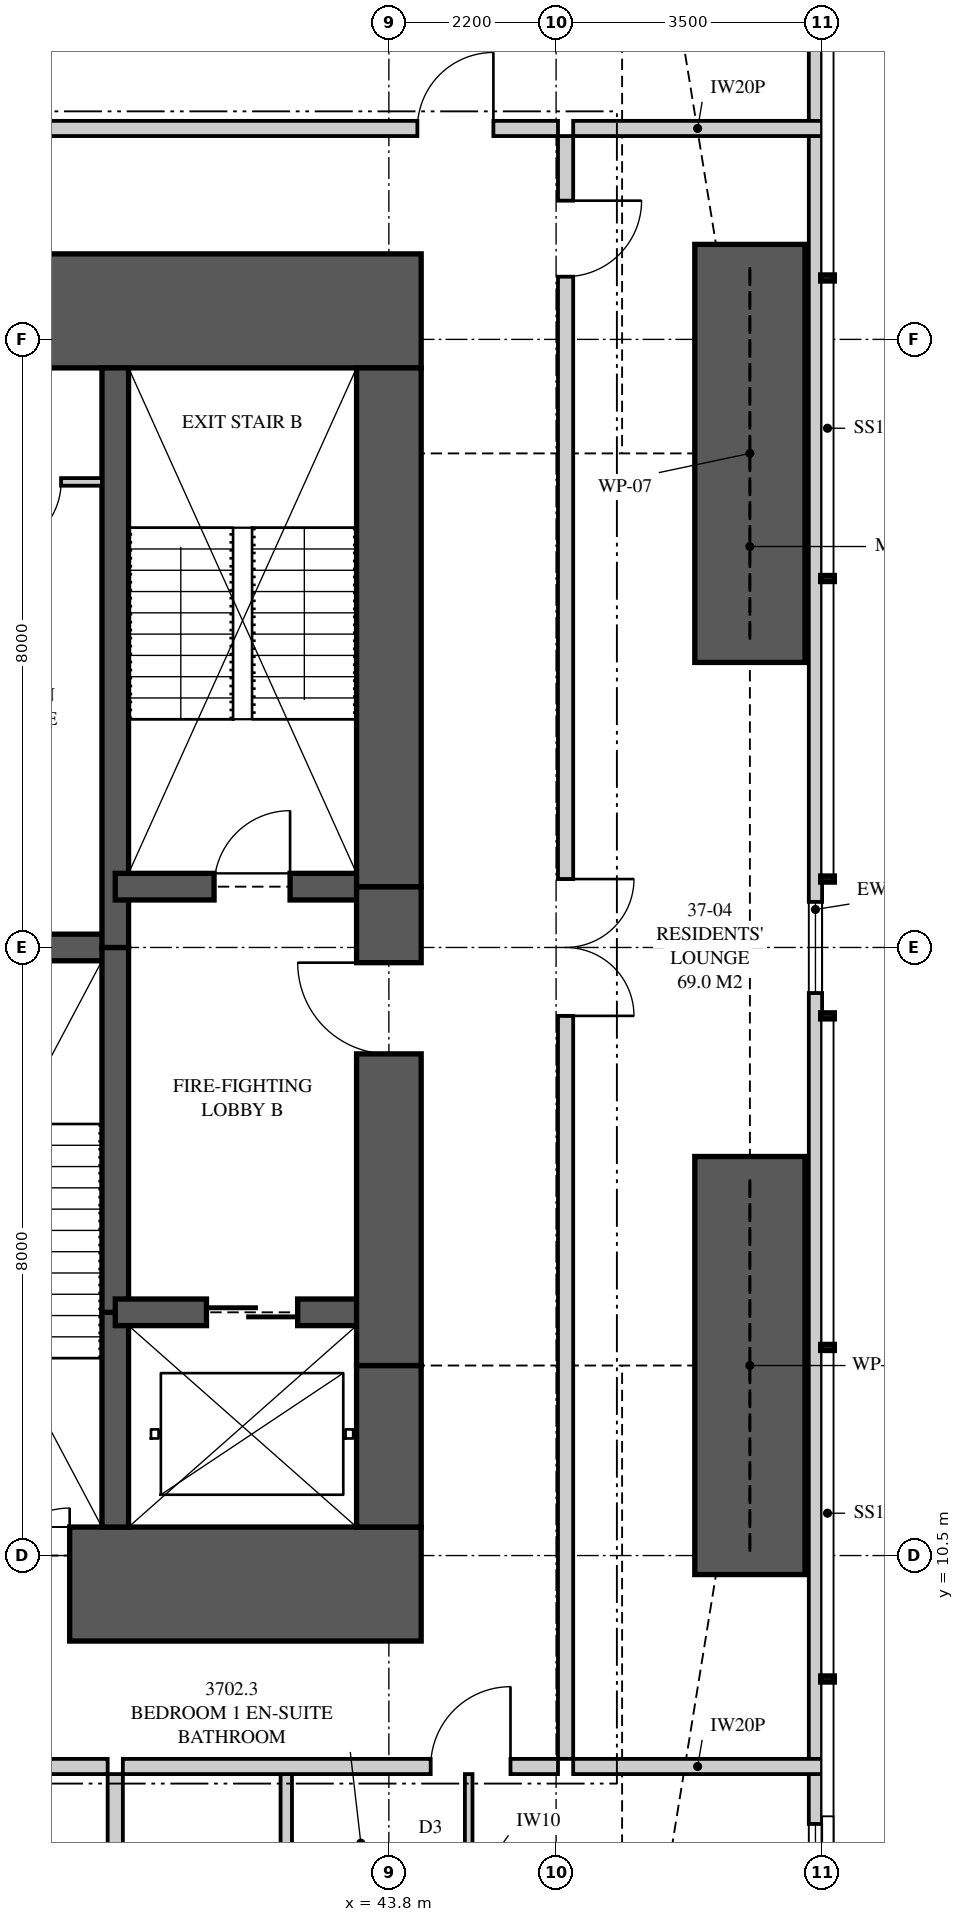
"""IFC4 building model, lengths in metres.
Left out: names, types, materials, properties, quantities, classifications, styles, units other than length and angle.
Written with IfcOpenShell. Run it as: python <this file> out.ifc"""

import sys

from ifc_helpers import new_model, si_unit, direction, frame, frame_2d, origin, place, context, subcontext, project, spatial, polyline, rectangle, outline, extrude, element, fill, save


model = new_model("IFC4")
c1 = context("Model", 3, precision=1e-05, world=origin(), true_north=direction((0.0, 1.0)))
c2 = subcontext(c1, "Body", "Model", "MODEL_VIEW")
j1 = project(units=[si_unit("LENGTHUNIT", "METRE"), si_unit("PLANEANGLEUNIT", "RADIAN")], contexts=[c1])
p1 = place(None, origin())
s1 = spatial("IfcSite", under=j1, at=p1, CompositionType="ELEMENT")
p2 = place(p1, origin())
s2 = spatial("IfcBuilding", under=s1, at=p2, CompositionType="ELEMENT")
p3 = place(p2, frame((0.0, 0.0, 135.0)))
s3 = spatial("IfcBuildingStorey", under=s2, at=p3, CompositionType="ELEMENT", Elevation=135.0)
p4 = place(p3, frame((35.9, 10.125, 0.0), z_axis=(0.0, 0.0, 1.0), x_axis=(1.0, 0.0, 0.0)))
e1 = element("IfcWall", 1, at=p4, inside=s3, PredefinedType="SHEAR", context=c2, shape_type="SweptSolid", body=[
    extrude(rectangle(XDim=8.325, YDim=1.5, at=frame_2d((4.163, 0.0))), origin(), (0.0, 0.0, 1.0), 3.35),
])
p5 = place(p4, frame((2.7, 0.0, 0.0)))
e2 = element("IfcOpeningElement", 2, at=p5, cuts=e1, PredefinedType="OPENING", context=c2, shape_type="SweptSolid", body=[
    extrude(rectangle(XDim=1.0, YDim=2.1, at=frame_2d((0.5, 1.05))), frame((0.0, 0.76, 0.0), z_axis=(0.0, -1.0, 0.0), x_axis=(1.0, 0.0, 0.0)), (0.0, 0.0, 1.0), 1.52),
])
p6 = place(p3, frame((44.225, 26.875, 0.0), z_axis=(0.0, 0.0, 1.0), x_axis=(-1.0, 0.0, 0.0)))
e3 = element("IfcWall", 3, at=p6, inside=s3, PredefinedType="SHEAR", context=c2, shape_type="SweptSolid", body=[
    extrude(rectangle(XDim=8.325, YDim=1.5, at=frame_2d((4.163, 0.0))), origin(), (0.0, 0.0, 1.0), 3.35),
])
p7 = place(p6, frame((5.725, 0.0, 0.0)))
e4 = element("IfcOpeningElement", 4, at=p7, cuts=e3, PredefinedType="OPENING", context=c2, shape_type="SweptSolid", body=[
    extrude(rectangle(XDim=0.9, YDim=2.1, at=frame_2d((0.45, 1.05))), frame((0.0, 0.76, 0.0), z_axis=(0.0, -1.0, 0.0), x_axis=(1.0, 0.0, 0.0)), (0.0, 0.0, 1.0), 1.52),
])
p8 = place(p3, frame((43.8, 10.875, 0.0), z_axis=(0.0, 0.0, 1.0), x_axis=(0.0, 1.0, 0.0)))
e5 = element("IfcWall", 5, at=p8, inside=s3, PredefinedType="SHEAR", context=c2, shape_type="SweptSolid", body=[
    extrude(rectangle(XDim=2.125, YDim=0.85, at=frame_2d((1.062, 0.0))), origin(), (0.0, 0.0, 1.0), 3.35),
])
p9 = place(p3, frame((43.8, 13.0, 0.0), z_axis=(0.0, 0.0, 1.0), x_axis=(0.0, 1.0, 0.0)))
e6 = element("IfcWall", 6, at=p9, inside=s3, PredefinedType="SHEAR", context=c2, shape_type="SweptSolid", body=[
    extrude(rectangle(XDim=6.3, YDim=0.85, at=frame_2d((3.15, 0.0))), origin(), (0.0, 0.0, 1.0), 3.35),
])
p10 = place(p9, frame((4.1, 0.0, 0.0)))
e7 = element("IfcOpeningElement", 7, at=p10, cuts=e6, PredefinedType="OPENING", context=c2, shape_type="SweptSolid", body=[
    extrude(rectangle(XDim=1.2, YDim=2.2, at=frame_2d((0.6, 1.1))), frame((0.0, 0.435, 0.0), z_axis=(0.0, -1.0, 0.0), x_axis=(1.0, 0.0, 0.0)), (0.0, 0.0, 1.0), 0.87),
])
p11 = place(p3, frame((43.8, 19.3, 0.0), z_axis=(0.0, 0.0, 1.0), x_axis=(0.0, 1.0, 0.0)))
e8 = element("IfcWall", 8, at=p11, inside=s3, PredefinedType="SHEAR", context=c2, shape_type="SweptSolid", body=[
    extrude(rectangle(XDim=6.825, YDim=0.85, at=frame_2d((3.413, 0.0))), origin(), (0.0, 0.0, 1.0), 3.35),
])
p12 = place(p3, frame((40.2, 10.875, 0.0), z_axis=(0.0, 0.0, 1.0), x_axis=(0.0, 1.0, 0.0)))
e9 = element("IfcWall", 9, at=p12, inside=s3, PredefinedType="SHEAR", context=c2, shape_type="SweptSolid", body=[
    extrude(rectangle(XDim=2.825, YDim=0.35, at=frame_2d((1.413, 0.0))), origin(), (0.0, 0.0, 1.0), 3.35),
])
p13 = place(p3, frame((40.2, 13.7, 0.0), z_axis=(0.0, 0.0, 1.0), x_axis=(0.0, 1.0, 0.0)))
e10 = element("IfcWall", 10, at=p13, inside=s3, PredefinedType="SHEAR", context=c2, shape_type="SweptSolid", body=[
    extrude(rectangle(XDim=4.8, YDim=0.35, at=frame_2d((2.4, 0.0))), origin(), (0.0, 0.0, 1.0), 3.35),
])
p14 = place(p3, frame((40.2, 18.5, 0.0), z_axis=(0.0, 0.0, 1.0), x_axis=(0.0, 1.0, 0.0)))
e11 = element("IfcWall", 11, at=p14, inside=s3, PredefinedType="SHEAR", context=c2, shape_type="SweptSolid", body=[
    extrude(rectangle(XDim=7.625, YDim=0.35, at=frame_2d((3.812, 0.0))), origin(), (0.0, 0.0, 1.0), 3.35),
])
p15 = place(p3, frame((35.9, 18.5, 0.0), z_axis=(0.0, 0.0, 1.0), x_axis=(1.0, 0.0, 0.0)))
e12 = element("IfcWall", 12, at=p15, inside=s3, PredefinedType="SHEAR", context=c2, shape_type="SweptSolid", body=[
    extrude(rectangle(XDim=4.3, YDim=0.35, at=frame_2d((2.15, 0.0))), origin(), (0.0, 0.0, 1.0), 3.35),
])
p16 = place(p3, frame((40.2, 13.7, 0.0), z_axis=(0.0, 0.0, 1.0), x_axis=(1.0, 0.0, 0.0)))
e13 = element("IfcWall", 13, at=p16, inside=s3, PredefinedType="SHEAR", context=c2, shape_type="SweptSolid", body=[
    extrude(rectangle(XDim=3.6, YDim=0.35, at=frame_2d((1.8, 0.0))), origin(), (0.0, 0.0, 1.0), 3.35),
])
p17 = place(p16, frame((1.2, 0.0, 0.0)))
e14 = element("IfcOpeningElement", 14, at=p17, cuts=e13, PredefinedType="OPENING", context=c2, shape_type="SweptSolid", body=[
    extrude(rectangle(XDim=1.2, YDim=2.1, at=frame_2d((0.6, 1.05))), frame((0.0, 0.185, 0.0), z_axis=(0.0, -1.0, 0.0), x_axis=(1.0, 0.0, 0.0)), (0.0, 0.0, 1.0), 0.37),
])
p18 = place(p3, frame((40.2, 19.3, 0.0), z_axis=(0.0, 0.0, 1.0), x_axis=(1.0, 0.0, 0.0)))
e15 = element("IfcWall", 15, at=p18, inside=s3, PredefinedType="SHEAR", context=c2, shape_type="SweptSolid", body=[
    extrude(rectangle(XDim=3.6, YDim=0.35, at=frame_2d((1.8, 0.0))), origin(), (0.0, 0.0, 1.0), 3.35),
])
p19 = place(p18, frame((1.3, 0.0, 0.0)))
e16 = element("IfcOpeningElement", 16, at=p19, cuts=e15, PredefinedType="OPENING", context=c2, shape_type="SweptSolid", body=[
    extrude(rectangle(XDim=1.0, YDim=2.1, at=frame_2d((0.5, 1.05))), frame((0.0, 0.185, 0.0), z_axis=(0.0, -1.0, 0.0), x_axis=(1.0, 0.0, 0.0)), (0.0, 0.0, 1.0), 0.37),
])
p20 = place(p3, frame((49.413, 3.051, 0.0), z_axis=(0.0, 0.0, 1.0), x_axis=(0.0, 1.0, 0.0)))
e17 = element("IfcWall", 17, at=p20, inside=s3, PredefinedType="SOLIDWALL", context=c2, shape_type="SweptSolid", body=[
    extrude(outline(polyline([(0.0, 0.0), (31.897, 0.0), (31.897, 3.11), (22.167, 3.11), (22.167, 2.15), (22.074, 2.15), (22.074, 3.11), (21.949, 3.11), (21.949, 2.15), (9.949, 2.15), (9.949, 3.11), (9.823, 3.11), (9.823, 2.15), (9.73, 2.15), (9.73, 3.11), (0.0, 3.11), (0.0, 0.0)])), frame((0.0, 0.087, 0.0), z_axis=(0.0, -1.0, 0.0), x_axis=(1.0, 0.0, 0.0)), (0.0, 0.0, 1.0), 0.175),
])
p21 = place(p20, frame((2.118, 0.0, 0.4)))
e18 = element("IfcOpeningElement", 18, at=p21, cuts=e17, PredefinedType="OPENING", context=c2, shape_type="SweptSolid", body=[
    extrude(rectangle(XDim=1.8, YDim=1.7, at=frame_2d((0.9, 0.85))), frame((0.0, 0.097, 0.0), z_axis=(0.0, -1.0, 0.0), x_axis=(1.0, 0.0, 0.0)), (0.0, 0.0, 1.0), 0.195),
])
p22 = place(p20, frame((14.849, 0.0, 0.4)))
e19 = element("IfcOpeningElement", 19, at=p22, cuts=e17, PredefinedType="OPENING", context=c2, shape_type="SweptSolid", body=[
    extrude(rectangle(XDim=1.2, YDim=1.7, at=frame_2d((0.6, 0.85))), frame((0.0, 0.097, 0.0), z_axis=(0.0, -1.0, 0.0), x_axis=(1.0, 0.0, 0.0)), (0.0, 0.0, 1.0), 0.195),
])
p23 = place(p20, frame((28.51, 0.0, 0.4)))
e20 = element("IfcOpeningElement", 20, at=p23, cuts=e17, PredefinedType="OPENING", context=c2, shape_type="SweptSolid", body=[
    extrude(rectangle(XDim=1.2, YDim=1.7, at=frame_2d((0.6, 0.85))), frame((0.0, 0.097, 0.0), z_axis=(0.0, -1.0, 0.0), x_axis=(1.0, 0.0, 0.0)), (0.0, 0.0, 1.0), 0.195),
])
p24 = place(p3, frame((40.2, 0.175, 0.0), z_axis=(0.0, 0.0, 1.0), x_axis=(0.0, 1.0, 0.0)))
e21 = element("IfcWall", 21, at=p24, inside=s3, PredefinedType="PARTITIONING", context=c2, shape_type="SweptSolid", body=[
    extrude(outline(polyline([(0.167, 3.11), (0.0, 3.11), (0.0, 0.0), (0.529, 0.0), (0.529, 0.427), (1.021, 0.427), (1.021, 0.0), (7.45, 0.0), (7.45, 3.11), (3.766, 3.11), (3.766, 2.51), (2.025, 2.51), (2.025, 2.15), (1.021, 2.15), (1.021, 1.723), (0.529, 1.723), (0.529, 2.15), (0.167, 2.15), (0.167, 3.11)])), frame((0.0, 0.1, 0.0), z_axis=(0.0, -1.0, 0.0), x_axis=(1.0, 0.0, 0.0)), (0.0, 0.0, 1.0), 0.2),
])
p25 = place(p3, frame((17.775, 7.725, 0.0), z_axis=(0.0, 0.0, 1.0), x_axis=(1.0, 0.0, 0.0)))
e22 = element("IfcWall", 22, at=p25, inside=s3, PredefinedType="PARTITIONING", context=c2, shape_type="SweptSolid", body=[
    extrude(outline(polyline([(0.0, 0.0), (22.325, 0.0), (22.325, 3.11), (21.187, 3.11), (21.187, 2.541), (20.513, 2.541), (20.513, 3.11), (10.312, 3.11), (10.312, 2.541), (9.638, 2.541), (9.638, 3.11), (0.0, 3.11), (0.0, 0.0)])), frame((0.0, 0.1, 0.0), z_axis=(0.0, -1.0, 0.0), x_axis=(1.0, 0.0, 0.0)), (0.0, 0.0, 1.0), 0.2),
])
p26 = place(p25, frame((4.825, 0.0, 0.0)))
e23 = element("IfcOpeningElement", 23, at=p26, cuts=e22, PredefinedType="OPENING", context=c2, shape_type="SweptSolid", body=[
    extrude(rectangle(XDim=1.05, YDim=2.2, at=frame_2d((0.525, 1.1))), frame((0.0, 0.11, 0.0), z_axis=(0.0, -1.0, 0.0), x_axis=(1.0, 0.0, 0.0)), (0.0, 0.0, 1.0), 0.22),
])
p27 = place(p3, frame((40.3, 7.725, 0.0), z_axis=(0.0, 0.0, 1.0), x_axis=(1.0, 0.0, 0.0)))
e24 = element("IfcWall", 24, at=p27, inside=s3, PredefinedType="PARTITIONING", context=c2, shape_type="SweptSolid", body=[
    extrude(rectangle(XDim=5.725, YDim=0.2, at=frame_2d((2.862, 0.0))), origin(), (0.0, 0.0, 1.0), 3.11),
])
p28 = place(p27, frame((4.05, 0.0, 0.0)))
e25 = element("IfcOpeningElement", 25, at=p28, cuts=e24, PredefinedType="OPENING", context=c2, shape_type="SweptSolid", body=[
    extrude(rectangle(XDim=1.05, YDim=2.2, at=frame_2d((0.525, 1.1))), frame((0.0, 0.11, 0.0), z_axis=(0.0, -1.0, 0.0), x_axis=(1.0, 0.0, 0.0)), (0.0, 0.0, 1.0), 0.22),
])
p29 = place(p3, frame((44.85, 4.539, 0.0), z_axis=(0.0, 0.0, 1.0), x_axis=(0.0, 1.0, 0.0)))
e26 = element("IfcWall", 26, at=p29, inside=s3, PredefinedType="PARTITIONING", context=c2, shape_type="SweptSolid", body=[
    extrude(rectangle(XDim=3.086, YDim=0.1, at=frame_2d((1.543, 0.0))), origin(), (0.0, 0.0, 1.0), 3.11),
])
p30 = place(p29, frame((1.056, 0.0, 0.0)))
e27 = element("IfcOpeningElement", 27, at=p30, cuts=e26, PredefinedType="OPENING", context=c2, shape_type="SweptSolid", body=[
    extrude(rectangle(XDim=0.9, YDim=2.1, at=frame_2d((0.45, 1.05))), frame((0.0, 0.06, 0.0), z_axis=(0.0, -1.0, 0.0), x_axis=(1.0, 0.0, 0.0)), (0.0, 0.0, 1.0), 0.12),
])
p31 = place(p3, frame((42.45, 4.539, 0.0), z_axis=(0.0, 0.0, 1.0), x_axis=(0.0, 1.0, 0.0)))
e28 = element("IfcWall", 28, at=p31, inside=s3, PredefinedType="PLUMBINGWALL", context=c2, shape_type="SweptSolid", body=[
    extrude(rectangle(XDim=3.086, YDim=0.15, at=frame_2d((1.543, 0.0))), origin(), (0.0, 0.0, 1.0), 3.11),
])
p32 = place(p3, frame((46.225, 7.725, 0.0), z_axis=(0.0, 0.0, 1.0), x_axis=(1.0, 0.0, 0.0)))
e29 = element("IfcWall", 29, at=p32, inside=s3, PredefinedType="PARTITIONING", context=c2, shape_type="SweptSolid", body=[
    extrude(outline(polyline([(0.0, 0.0), (3.275, 0.0), (3.275, 3.11), (2.392, 3.11), (2.392, 2.15), (0.643, 2.15), (0.643, 2.541), (0.306, 2.541), (0.306, 3.11), (0.0, 3.11), (0.0, 0.0)])), frame((0.0, 0.1, 0.0), z_axis=(0.0, -1.0, 0.0), x_axis=(1.0, 0.0, 0.0)), (0.0, 0.0, 1.0), 0.2),
])
p33 = place(p3, frame((46.225, 29.275, 0.0), z_axis=(0.0, 0.0, 1.0), x_axis=(1.0, 0.0, 0.0)))
e30 = element("IfcWall", 30, at=p33, inside=s3, PredefinedType="PARTITIONING", context=c2, shape_type="SweptSolid", body=[
    extrude(outline(polyline([(0.0, 0.0), (3.275, 0.0), (3.275, 3.11), (2.554, 3.11), (2.554, 2.15), (0.805, 2.15), (0.805, 2.541), (0.306, 2.541), (0.306, 3.11), (0.0, 3.11), (0.0, 0.0)])), frame((0.0, 0.1, 0.0), z_axis=(0.0, -1.0, 0.0), x_axis=(1.0, 0.0, 0.0)), (0.0, 0.0, 1.0), 0.2),
])
p34 = place(p3, frame((46.125, 7.825, 0.0), z_axis=(0.0, 0.0, 1.0), x_axis=(0.0, 1.0, 0.0)))
e31 = element("IfcWall", 31, at=p34, inside=s3, PredefinedType="PARTITIONING", context=c2, shape_type="SweptSolid", body=[
    extrude(outline(polyline([(0.0, 0.0), (21.35, 0.0), (21.35, 3.11), (17.512, 3.11), (17.512, 2.541), (16.838, 2.541), (16.838, 3.11), (5.512, 3.11), (5.512, 2.541), (4.838, 2.541), (4.838, 3.11), (0.0, 3.11), (0.0, 0.0)])), frame((0.0, 0.1, 0.0), z_axis=(0.0, -1.0, 0.0), x_axis=(1.0, 0.0, 0.0)), (0.0, 0.0, 1.0), 0.2),
])
p35 = place(p34, frame((9.775, 0.0, 0.0)))
e32 = element("IfcOpeningElement", 32, at=p35, cuts=e31, PredefinedType="OPENING", context=c2, shape_type="SweptSolid", body=[
    extrude(rectangle(XDim=1.8, YDim=2.1, at=frame_2d((0.9, 1.05))), frame((0.0, 0.11, 0.0), z_axis=(0.0, -1.0, 0.0), x_axis=(1.0, 0.0, 0.0)), (0.0, 0.0, 1.0), 0.22),
])
p36 = place(p34, frame((19.5, 0.0, 0.0)))
e33 = element("IfcOpeningElement", 33, at=p36, cuts=e31, PredefinedType="OPENING", context=c2, shape_type="SweptSolid", body=[
    extrude(rectangle(XDim=1.0, YDim=2.1, at=frame_2d((0.5, 1.05))), frame((0.0, 0.11, 0.0), z_axis=(0.0, -1.0, 0.0), x_axis=(1.0, 0.0, 0.0)), (0.0, 0.0, 1.0), 0.22),
])
p37 = place(p3, frame((38.312, 29.275, 0.0), z_axis=(0.0, 0.0, 1.0), x_axis=(1.0, 0.0, 0.0)))
e34 = element("IfcWall", 34, at=p37, inside=s3, PredefinedType="PARTITIONING", context=c2, shape_type="SweptSolid", body=[
    extrude(outline(polyline([(0.0, 0.0), (7.712, 0.0), (7.712, 3.11), (0.65, 3.11), (0.65, 2.541), (0.0, 2.541), (0.0, 3.11), (0.0, 0.0)])), frame((0.0, 0.1, 0.0), z_axis=(0.0, -1.0, 0.0), x_axis=(1.0, 0.0, 0.0)), (0.0, 0.0, 1.0), 0.2),
])
p38 = place(p37, frame((5.863, 0.0, 0.0)))
e35 = element("IfcOpeningElement", 35, at=p38, cuts=e34, PredefinedType="OPENING", context=c2, shape_type="SweptSolid", body=[
    extrude(rectangle(XDim=1.0, YDim=2.1, at=frame_2d((0.5, 1.05))), frame((0.0, 0.11, 0.0), z_axis=(0.0, -1.0, 0.0), x_axis=(1.0, 0.0, 0.0)), (0.0, 0.0, 1.0), 0.22),
])
p39 = place(p3, frame((36.075, 24.625, 0.0), z_axis=(0.0, 0.0, 1.0), x_axis=(1.0, 0.0, 0.0)))
e36 = element("IfcWall", 36, at=p39, inside=s3, PredefinedType="PARTITIONING", context=c2, shape_type="SweptSolid", body=[
    extrude(rectangle(XDim=3.95, YDim=0.1, at=frame_2d((1.975, 0.0))), origin(), (0.0, 0.0, 1.0), 3.11),
])
p40 = place(p39, frame((0.538, 0.0, 0.0)))
e37 = element("IfcOpeningElement", 37, at=p40, cuts=e36, PredefinedType="OPENING", context=c2, shape_type="SweptSolid", body=[
    extrude(rectangle(XDim=0.9, YDim=2.1, at=frame_2d((0.45, 1.05))), frame((0.0, 0.06, 0.0), z_axis=(0.0, -1.0, 0.0), x_axis=(1.0, 0.0, 0.0)), (0.0, 0.0, 1.0), 0.12),
])
p41 = place(p39, frame((2.512, 0.0, 0.0)))
e38 = element("IfcOpeningElement", 38, at=p41, cuts=e36, PredefinedType="OPENING", context=c2, shape_type="SweptSolid", body=[
    extrude(rectangle(XDim=0.9, YDim=2.1, at=frame_2d((0.45, 1.05))), frame((0.0, 0.06, 0.0), z_axis=(0.0, -1.0, 0.0), x_axis=(1.0, 0.0, 0.0)), (0.0, 0.0, 1.0), 0.12),
])
for number, where, z_axis, x_axis in (
    (39, (48.55, 10.25, 0.0), (0.0, 0.0, 1.0), (0.0, 1.0, 0.0)),
    (40, (48.55, 22.25, 0.0), (0.0, 0.0, 1.0), (0.0, 1.0, 0.0)),
):
    element("IfcWall", number, at=place(p3, frame(where, z_axis=z_axis, x_axis=x_axis)), inside=s3, PredefinedType="SHEAR", context=c2, shape_type="SweptSolid", body=[
        extrude(rectangle(XDim=5.5, YDim=1.45, at=frame_2d((2.75, 0.0))), origin(), (0.0, 0.0, 1.0), 3.35),
    ])
p42 = place(p21, origin())
e41 = element("IfcWindow", 41, at=p42, inside=s3, PartitioningType="SINGLE_PANEL", PredefinedType="WINDOW", context=c2, shape_type="SweptSolid", body=[
    extrude(rectangle(XDim=1.8, YDim=1.7, at=frame_2d((0.9, 0.85))), frame((0.0, 0.03, 0.0), z_axis=(0.0, -1.0, 0.0), x_axis=(1.0, 0.0, 0.0)), (0.0, 0.0, 1.0), 0.06),
])
fill(e18, e41)
p43 = place(p22, origin())
e42 = element("IfcWindow", 42, at=p43, inside=s3, PartitioningType="SINGLE_PANEL", PredefinedType="WINDOW", context=c2, shape_type="SweptSolid", body=[
    extrude(rectangle(XDim=1.2, YDim=1.7, at=frame_2d((0.6, 0.85))), frame((0.0, 0.03, 0.0), z_axis=(0.0, -1.0, 0.0), x_axis=(1.0, 0.0, 0.0)), (0.0, 0.0, 1.0), 0.06),
])
fill(e19, e42)
p44 = place(p28, origin())
e43 = element("IfcDoor", 43, at=p44, inside=s3, OperationType="SINGLE_SWING_RIGHT", PredefinedType="DOOR", context=c2, shape_type="SweptSolid", body=[
    extrude(rectangle(XDim=1.05, YDim=2.2, at=frame_2d((0.525, 1.1))), frame((0.0, 0.025, 0.0), z_axis=(0.0, -1.0, 0.0), x_axis=(1.0, 0.0, 0.0)), (0.0, 0.0, 1.0), 0.05),
])
fill(e25, e43)
p45 = place(p38, origin())
e44 = element("IfcDoor", 44, at=p45, inside=s3, OperationType="SINGLE_SWING_RIGHT", PredefinedType="DOOR", context=c2, shape_type="SweptSolid", body=[
    extrude(rectangle(XDim=1.0, YDim=2.1, at=frame_2d((0.5, 1.05))), frame((0.0, 0.025, 0.0), z_axis=(0.0, -1.0, 0.0), x_axis=(1.0, 0.0, 0.0)), (0.0, 0.0, 1.0), 0.05),
])
fill(e35, e44)
p46 = place(p35, frame((1.8, 0.0, 0.0), z_axis=(0.0, 0.0, 1.0), x_axis=(-1.0, 0.0, 0.0)))
e45 = element("IfcDoor", 45, at=p46, inside=s3, OperationType="DOUBLE_DOOR_SINGLE_SWING", PredefinedType="DOOR", context=c2, shape_type="SweptSolid", body=[
    extrude(rectangle(XDim=1.8, YDim=2.1, at=frame_2d((0.9, 1.05))), frame((0.0, 0.025, 0.0), z_axis=(0.0, -1.0, 0.0), x_axis=(1.0, 0.0, 0.0)), (0.0, 0.0, 1.0), 0.05),
])
fill(e32, e45)
p47 = place(p36, frame((1.0, 0.0, 0.0), z_axis=(0.0, 0.0, 1.0), x_axis=(-1.0, 0.0, 0.0)))
e46 = element("IfcDoor", 46, at=p47, inside=s3, OperationType="SINGLE_SWING_LEFT", PredefinedType="DOOR", context=c2, shape_type="SweptSolid", body=[
    extrude(rectangle(XDim=1.0, YDim=2.1, at=frame_2d((0.5, 1.05))), frame((0.0, 0.025, 0.0), z_axis=(0.0, -1.0, 0.0), x_axis=(1.0, 0.0, 0.0)), (0.0, 0.0, 1.0), 0.05),
])
fill(e33, e46)
p48 = place(p41, frame((0.9, 0.0, 0.0), z_axis=(0.0, 0.0, 1.0), x_axis=(-1.0, 0.0, 0.0)))
e47 = element("IfcDoor", 47, at=p48, inside=s3, OperationType="SINGLE_SWING_RIGHT", PredefinedType="DOOR", context=c2, shape_type="SweptSolid", body=[
    extrude(rectangle(XDim=0.9, YDim=2.1, at=frame_2d((0.45, 1.05))), frame((0.0, 0.025, 0.0), z_axis=(0.0, -1.0, 0.0), x_axis=(1.0, 0.0, 0.0)), (0.0, 0.0, 1.0), 0.05),
])
fill(e38, e47)
p49 = place(p19, origin())
e48 = element("IfcDoor", 48, at=p49, inside=s3, OperationType="SINGLE_SWING_RIGHT", PredefinedType="DOOR", context=c2, shape_type="SweptSolid", body=[
    extrude(rectangle(XDim=1.0, YDim=2.1, at=frame_2d((0.5, 1.05))), frame((0.0, 0.025, 0.0), z_axis=(0.0, -1.0, 0.0), x_axis=(1.0, 0.0, 0.0)), (0.0, 0.0, 1.0), 0.05),
])
fill(e16, e48)
p50 = place(p10, origin())
e49 = element("IfcDoor", 49, at=p50, inside=s3, OperationType="SINGLE_SWING_RIGHT", PredefinedType="DOOR", context=c2, shape_type="SweptSolid", body=[
    extrude(rectangle(XDim=1.2, YDim=2.2, at=frame_2d((0.6, 1.1))), frame((0.0, 0.025, 0.0), z_axis=(0.0, -1.0, 0.0), x_axis=(1.0, 0.0, 0.0)), (0.0, 0.0, 1.0), 0.05),
])
fill(e7, e49)
p51 = place(p17, origin())
e50 = element("IfcDoor", 50, at=p51, inside=s3, OperationType="SLIDING_TO_LEFT", PredefinedType="DOOR", context=c2, shape_type="SweptSolid", body=[
    extrude(rectangle(XDim=1.2, YDim=2.1, at=frame_2d((0.6, 1.05))), frame((0.0, 0.025, 0.0), z_axis=(0.0, -1.0, 0.0), x_axis=(1.0, 0.0, 0.0)), (0.0, 0.0, 1.0), 0.05),
])
fill(e14, e50)
p52 = place(p5, origin())
e51 = element("IfcDoor", 51, at=p52, inside=s3, OperationType="SINGLE_SWING_RIGHT", PredefinedType="DOOR", context=c2, shape_type="SweptSolid", body=[
    extrude(rectangle(XDim=1.0, YDim=2.1, at=frame_2d((0.5, 1.05))), frame((0.0, 0.025, 0.0), z_axis=(0.0, -1.0, 0.0), x_axis=(1.0, 0.0, 0.0)), (0.0, 0.0, 1.0), 0.05),
])
fill(e2, e51)
save(model, sys.argv[1])
